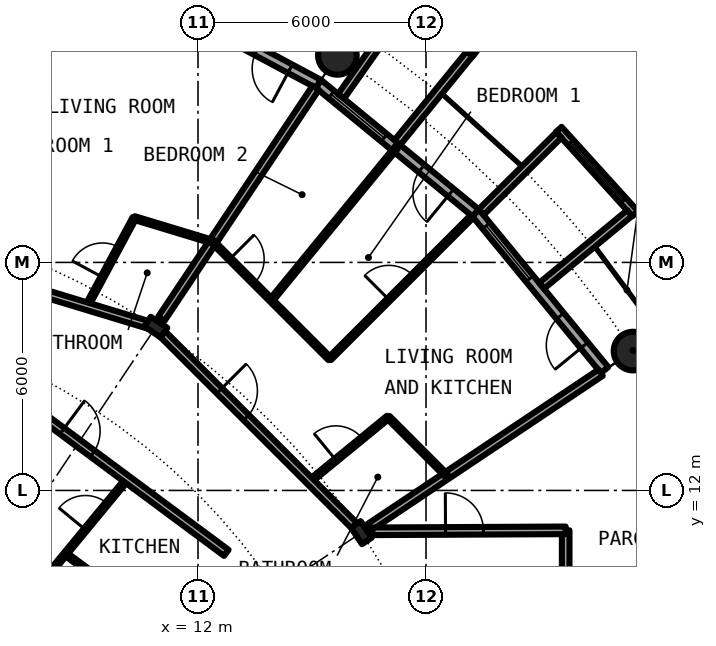
"""IFC4 building model, lengths in metres.
Left out: names, types, materials, properties, quantities, classifications, styles, units other than length and angle.
Written with IfcOpenShell. Run it as: python <this file> out.ifc"""

import sys

from ifc_helpers import new_model, si_unit, direction, frame, frame_2d, origin, origin_2d, place, context, subcontext, project, spatial, rectangle, circle, hollow_circle, i_section, extrude, element, fill, save


model = new_model("IFC4")
c1 = context("Model", 3, precision=1e-05, world=origin(), true_north=direction((0.0, 1.0)))
c2 = subcontext(c1, "Body", "Model", "MODEL_VIEW")
j1 = project(units=[si_unit("LENGTHUNIT", "METRE"), si_unit("PLANEANGLEUNIT", "RADIAN")], contexts=[c1])
p1 = place(None, origin())
s1 = spatial("IfcSite", under=j1, at=p1, CompositionType="ELEMENT")
p2 = place(p1, origin())
s2 = spatial("IfcBuilding", under=s1, at=p2, CompositionType="ELEMENT")
p3 = place(p2, frame((0.0, 0.0, 88.0)))
s3 = spatial("IfcBuildingStorey", under=s2, at=p3, CompositionType="ELEMENT", Elevation=88.0)
for number, where, z_axis, x_axis in (
    (1, (23.448, 15.667, 0.0), (0.0, 0.0, 1.0), (1.0, 0.0, 0.0)),
    (2, (15.667, 23.448, 0.0), (0.0, 0.0, 1.0), (1.0, 0.0, 0.0)),
):
    element("IfcColumn", number, at=place(p3, frame(where, z_axis=z_axis, x_axis=x_axis)), inside=s3, PredefinedType="COLUMN", context=c2, shape_type="SweptSolid", body=[
        extrude(hollow_circle(Radius=0.508, WallThickness=0.04, at=origin_2d()), origin(), (0.0, 0.0, 1.0), 3.05),
    ])
for number, where, z_axis, x_axis in (
    (3, (16.297, 10.889, 0.0), (0.0, 0.0, 1.0), (0.831, 0.556, 0.0)),
    (4, (10.889, 16.297, 0.0), (0.0, 0.0, 1.0), (0.556, 0.831, 0.0)),
):
    element("IfcColumn", number, at=place(p3, frame(where, z_axis=z_axis, x_axis=x_axis)), inside=s3, PredefinedType="COLUMN", context=c2, shape_type="SweptSolid", body=[
        extrude(i_section(OverallWidth=0.306, OverallDepth=0.524, WebThickness=0.021, FlangeThickness=0.04, FilletRadius=0.027, at=origin_2d()), origin(), (0.0, 0.0, 1.0), 3.05),
    ])
p4 = place(p3, frame((22.699, 15.167, 0.0), z_axis=(0.0, 0.0, 1.0), x_axis=(-0.634382322723, 0.773019449054, 0.0)))
e5 = element("IfcWall", 5, at=p4, inside=s3, PredefinedType="SOLIDWALL", context=c2, shape_type="SweptSolid", body=[
    extrude(rectangle(XDim=5.352, YDim=0.25, at=frame_2d((2.676, 0.0))), origin(), (0.0, 0.0, 1.0), 2.7),
])
p5 = place(p4, frame((0.841, 0.0, 0.0)))
e6 = element("IfcOpeningElement", 6, at=p5, cuts=e5, PredefinedType="OPENING", context=c2, shape_type="SweptSolid", body=[
    extrude(rectangle(XDim=1.0, YDim=2.2, at=frame_2d((0.5, 1.1))), frame((0.0, 0.135, 0.0), z_axis=(0.0, -1.0, 0.0), x_axis=(1.0, 0.0, 0.0)), (0.0, 0.0, 1.0), 0.27),
])
p6 = place(p4, frame((3.111, 0.0, 0.3)))
e7 = element("IfcOpeningElement", 7, at=p6, cuts=e5, PredefinedType="OPENING", context=c2, shape_type="SweptSolid", body=[
    extrude(rectangle(XDim=1.8, YDim=2.1, at=frame_2d((0.9, 1.05))), frame((0.0, 0.135, 0.0), z_axis=(0.0, -1.0, 0.0), x_axis=(1.0, 0.0, 0.0)), (0.0, 0.0, 1.0), 0.27),
])
p7 = place(p3, frame((23.503, 19.282, -0.03), z_axis=(0.0, 0.0, 1.0), x_axis=(-0.671506829416, 0.740998365753, 0.0)))
e8 = element("IfcWall", 8, at=p7, inside=s3, PredefinedType="SOLIDWALL", context=c2, shape_type="SweptSolid", body=[
    extrude(rectangle(XDim=2.993, YDim=0.2, at=frame_2d((1.497, 0.0))), origin(), (0.0, 0.0, 1.0), 2.73),
])
p8 = place(p7, frame((0.457, 0.0, 0.33)))
e9 = element("IfcOpeningElement", 9, at=p8, cuts=e8, PredefinedType="OPENING", context=c2, shape_type="SweptSolid", body=[
    extrude(circle(Radius=1.04, at=frame_2d((1.04, 1.04))), frame((0.0, 0.11, 0.0), z_axis=(0.0, -1.0, 0.0), x_axis=(1.0, 0.0, 0.0)), (0.0, 0.0, 1.0), 0.22),
])
p9 = place(p3, frame((21.041, 17.384, -0.03), z_axis=(0.0, 0.0, 1.0), x_axis=(0.770784861449, 0.63709551667, 0.0)))
e10 = element("IfcWall", 10, at=p9, inside=s3, PredefinedType="SOLIDWALL", context=c2, shape_type="SweptSolid", body=[
    extrude(rectangle(XDim=3.006, YDim=0.2, at=frame_2d((1.503, 0.0))), origin(), (0.0, 0.0, 1.0), 2.73),
])
p10 = place(p3, frame((19.45, 19.323, -0.03), z_axis=(0.0, 0.0, 1.0), x_axis=(0.709727076896, 0.704476739375, 0.0)))
e11 = element("IfcWall", 11, at=p10, inside=s3, PredefinedType="SOLIDWALL", context=c2, shape_type="SweptSolid", body=[
    extrude(rectangle(XDim=2.883, YDim=0.2, at=frame_2d((1.441, 0.0))), origin(), (0.0, 0.0, 1.0), 2.73),
])
p11 = place(p3, frame((19.304, 19.304, 0.0), z_axis=(0.0, 0.0, 1.0), x_axis=(-0.773019449054, 0.634382322723, 0.0)))
e12 = element("IfcWall", 12, at=p11, inside=s3, PredefinedType="SOLIDWALL", context=c2, shape_type="SweptSolid", body=[
    extrude(rectangle(XDim=5.352, YDim=0.25, at=frame_2d((2.676, 0.0))), origin(), (0.0, 0.0, 1.0), 2.7),
])
p12 = place(p11, frame((0.841, 0.0, 0.0)))
e13 = element("IfcOpeningElement", 13, at=p12, cuts=e12, PredefinedType="OPENING", context=c2, shape_type="SweptSolid", body=[
    extrude(rectangle(XDim=1.0, YDim=2.2, at=frame_2d((0.5, 1.1))), frame((0.0, 0.135, 0.0), z_axis=(0.0, -1.0, 0.0), x_axis=(1.0, 0.0, 0.0)), (0.0, 0.0, 1.0), 0.27),
])
p13 = place(p11, frame((3.111, 0.0, 0.3)))
e14 = element("IfcOpeningElement", 14, at=p13, cuts=e12, PredefinedType="OPENING", context=c2, shape_type="SweptSolid", body=[
    extrude(rectangle(XDim=1.8, YDim=2.1, at=frame_2d((0.9, 1.05))), frame((0.0, 0.135, 0.0), z_axis=(0.0, -1.0, 0.0), x_axis=(1.0, 0.0, 0.0)), (0.0, 0.0, 1.0), 0.27),
])
p14 = place(p3, frame((19.289, 23.497, -0.03), z_axis=(0.0, 0.0, 1.0), x_axis=(-0.796842165306, 0.60418752353, 0.0)))
e15 = element("IfcWall", 15, at=p14, inside=s3, PredefinedType="SOLIDWALL", context=c2, shape_type="SweptSolid", body=[
    extrude(rectangle(XDim=2.337, YDim=0.2, at=frame_2d((1.168, 0.0))), origin(), (0.0, 0.0, 1.0), 2.73),
])
p15 = place(p14, frame((0.128, 0.0, 0.33)))
e16 = element("IfcOpeningElement", 16, at=p15, cuts=e15, PredefinedType="OPENING", context=c2, shape_type="SweptSolid", body=[
    extrude(circle(Radius=1.04, at=frame_2d((1.04, 1.04))), frame((0.0, 0.11, 0.0), z_axis=(0.0, -1.0, 0.0), x_axis=(1.0, 0.0, 0.0)), (0.0, 0.0, 1.0), 0.22),
])
p16 = place(p3, frame((17.246, 21.155, -0.03), z_axis=(0.0, 0.0, 1.0), x_axis=(0.631741648902, 0.775179004516, 0.0)))
e17 = element("IfcWall", 17, at=p16, inside=s3, PredefinedType="SOLIDWALL", context=c2, shape_type="SweptSolid", body=[
    extrude(rectangle(XDim=3.006, YDim=0.2, at=frame_2d((1.503, 0.0))), origin(), (0.0, 0.0, 1.0), 2.73),
])
p17 = place(p3, frame((15.765, 22.37, -0.03), z_axis=(0.0, 0.0, 1.0), x_axis=(0.576274612209, 0.817256123454, 0.0)))
e18 = element("IfcWall", 18, at=p17, inside=s3, PredefinedType="SOLIDWALL", context=c2, shape_type="SweptSolid", body=[
    extrude(rectangle(XDim=2.933, YDim=0.2, at=frame_2d((1.466, 0.0))), origin(), (0.0, 0.0, 1.0), 2.73),
])
p18 = place(p3, frame((15.167, 22.699, 0.0), z_axis=(0.0, 0.0, 1.0), x_axis=(-0.881915646801, 0.471407246368, 0.0)))
e19 = element("IfcWall", 19, at=p18, inside=s3, PredefinedType="SOLIDWALL", context=c2, shape_type="SweptSolid", body=[
    extrude(rectangle(XDim=5.352, YDim=0.25, at=frame_2d((2.676, 0.0))), origin(), (0.0, 0.0, 1.0), 2.7),
])
p19 = place(p18, frame((0.841, 0.0, 0.0)))
e20 = element("IfcOpeningElement", 20, at=p19, cuts=e19, PredefinedType="OPENING", context=c2, shape_type="SweptSolid", body=[
    extrude(rectangle(XDim=1.0, YDim=2.2, at=frame_2d((0.5, 1.1))), frame((0.0, 0.135, 0.0), z_axis=(0.0, -1.0, 0.0), x_axis=(1.0, 0.0, 0.0)), (0.0, 0.0, 1.0), 0.27),
])
p20 = place(p18, frame((3.111, 0.0, 0.3)))
e21 = element("IfcOpeningElement", 21, at=p20, cuts=e19, PredefinedType="OPENING", context=c2, shape_type="SweptSolid", body=[
    extrude(rectangle(XDim=1.8, YDim=2.1, at=frame_2d((0.9, 1.05))), frame((0.0, 0.135, 0.0), z_axis=(0.0, -1.0, 0.0), x_axis=(1.0, 0.0, 0.0)), (0.0, 0.0, 1.0), 0.27),
])
p21 = place(p3, frame((21.675, 9.3, 0.0), z_axis=(0.0, 0.0, 1.0), x_axis=(0.0, 1.0, 0.0)))
e22 = element("IfcWall", 22, at=p21, inside=s3, PredefinedType="PARTITIONING", context=c2, shape_type="SweptSolid", body=[
    extrude(rectangle(XDim=1.65, YDim=0.2, at=frame_2d((0.825, 0.0))), origin(), (0.0, 0.0, 1.0), 2.7),
])
p22 = place(p3, frame((4.909, 5.958, 0.0), z_axis=(0.0, 0.0, 1.0), x_axis=(0.635976043025, 0.771708800454, 0.0)))
e23 = element("IfcWall", 23, at=p22, inside=s3, PredefinedType="PARTITIONING", context=c2, shape_type="SweptSolid", body=[
    extrude(rectangle(XDim=8.213, YDim=0.1, at=frame_2d((4.106, 0.0))), origin(), (0.0, 0.0, 1.0), 2.7),
])
p23 = place(p22, frame((6.49, 0.0, 0.0)))
e24 = element("IfcOpeningElement", 24, at=p23, cuts=e23, PredefinedType="OPENING", context=c2, shape_type="SweptSolid", body=[
    extrude(rectangle(XDim=0.9, YDim=2.3, at=frame_2d((0.45, 1.15))), frame((0.0, 0.06, 0.0), z_axis=(0.0, -1.0, 0.0), x_axis=(1.0, 0.0, 0.0)), (0.0, 0.0, 1.0), 0.12),
])
p24 = place(p22, frame((2.384, 0.0, 0.0)))
e25 = element("IfcOpeningElement", 25, at=p24, cuts=e23, PredefinedType="OPENING", context=c2, shape_type="SweptSolid", body=[
    extrude(rectangle(XDim=0.9, YDim=2.3, at=frame_2d((0.45, 1.15))), frame((0.0, 0.06, 0.0), z_axis=(0.0, -1.0, 0.0), x_axis=(1.0, 0.0, 0.0)), (0.0, 0.0, 1.0), 0.12),
])
p25 = place(p3, frame((9.074, 16.847, 0.0), z_axis=(0.0, 0.0, 1.0), x_axis=(0.474160570331, 0.880438387136, 0.0)))
e26 = element("IfcWall", 26, at=p25, inside=s3, PredefinedType="PARTITIONING", context=c2, shape_type="SweptSolid", body=[
    extrude(rectangle(XDim=2.636, YDim=0.1, at=frame_2d((1.318, 0.0))), origin(), (0.0, 0.0, 1.0), 2.7),
])
p26 = place(p25, frame((0.868, 0.0, 0.0)))
e27 = element("IfcOpeningElement", 27, at=p26, cuts=e26, PredefinedType="OPENING", context=c2, shape_type="SweptSolid", body=[
    extrude(rectangle(XDim=0.9, YDim=2.3, at=frame_2d((0.45, 1.15))), frame((0.0, 0.06, 0.0), z_axis=(0.0, -1.0, 0.0), x_axis=(1.0, 0.0, 0.0)), (0.0, 0.0, 1.0), 0.12),
])
p27 = place(p3, frame((11.035, 16.515, 0.0), z_axis=(0.0, 0.0, 1.0), x_axis=(0.555516661303, 0.831505405283, 0.0)))
e28 = element("IfcWall", 28, at=p27, inside=s3, PredefinedType="PARTITIONING", context=c2, shape_type="SweptSolid", body=[
    extrude(rectangle(XDim=7.312, YDim=0.2, at=frame_2d((3.656, 0.0))), origin(), (0.0, 0.0, 1.0), 2.7),
])
p28 = place(p3, frame((13.927, 17.004, 0.0), z_axis=(0.0, 0.0, 1.0), x_axis=(0.633774976367, 0.773517471898, 0.0)))
e29 = element("IfcWall", 29, at=p28, inside=s3, PredefinedType="PARTITIONING", context=c2, shape_type="SweptSolid", body=[
    extrude(rectangle(XDim=5.196, YDim=0.1, at=frame_2d((2.598, 0.0))), origin(), (0.0, 0.0, 1.0), 2.7),
])
p29 = place(p3, frame((14.945, 12.241, 0.0), z_axis=(0.0, 0.0, 1.0), x_axis=(0.77367517848, 0.633582447834, 0.0)))
e30 = element("IfcWall", 30, at=p29, inside=s3, PredefinedType="PARTITIONING", context=c2, shape_type="SweptSolid", body=[
    extrude(rectangle(XDim=2.661, YDim=0.1, at=frame_2d((1.331, 0.0))), origin(), (0.0, 0.0, 1.0), 2.7),
])
p30 = place(p29, frame((0.881, 0.0, 0.0)))
e31 = element("IfcOpeningElement", 31, at=p30, cuts=e30, PredefinedType="OPENING", context=c2, shape_type="SweptSolid", body=[
    extrude(rectangle(XDim=0.9, YDim=2.3, at=frame_2d((0.45, 1.15))), frame((0.0, 0.06, 0.0), z_axis=(0.0, -1.0, 0.0), x_axis=(1.0, 0.0, 0.0)), (0.0, 0.0, 1.0), 0.12),
])
p31 = place(p3, frame((15.465, 15.465, 0.0), z_axis=(0.0, 0.0, 1.0), x_axis=(0.707106781187, 0.707106781187, 0.0)))
e32 = element("IfcWall", 32, at=p31, inside=s3, PredefinedType="PARTITIONING", context=c2, shape_type="SweptSolid", body=[
    extrude(rectangle(XDim=5.305, YDim=0.1, at=frame_2d((2.652, 0.0))), origin(), (0.0, 0.0, 1.0), 2.7),
])
p32 = place(p31, frame((2.202, 0.0, 0.0)))
e33 = element("IfcOpeningElement", 33, at=p32, cuts=e32, PredefinedType="OPENING", context=c2, shape_type="SweptSolid", body=[
    extrude(rectangle(XDim=0.9, YDim=2.3, at=frame_2d((0.45, 1.15))), frame((0.0, 0.06, 0.0), z_axis=(0.0, -1.0, 0.0), x_axis=(1.0, 0.0, 0.0)), (0.0, 0.0, 1.0), 0.12),
])
p33 = place(p3, frame((16.515, 11.034, 0.0), z_axis=(0.0, 0.0, 1.0), x_axis=(0.831382022135, 0.555701298605, 0.0)))
e34 = element("IfcWall", 34, at=p33, inside=s3, PredefinedType="PARTITIONING", context=c2, shape_type="SweptSolid", body=[
    extrude(rectangle(XDim=7.313, YDim=0.2, at=frame_2d((3.657, 0.0))), origin(), (0.0, 0.0, 1.0), 2.7),
])
p34 = place(p3, frame((16.588, 10.925, 0.0), z_axis=(0.0, 0.0, 1.0), x_axis=(0.999988019025, 0.004895079807, 0.0)))
e35 = element("IfcWall", 35, at=p34, inside=s3, PredefinedType="PARTITIONING", context=c2, shape_type="SweptSolid", body=[
    extrude(rectangle(XDim=5.087, YDim=0.2, at=frame_2d((2.543, 0.0))), origin(), (0.0, 0.0, 1.0), 2.7),
])
p35 = place(p34, frame((1.925, 0.0, 0.0)))
e36 = element("IfcOpeningElement", 36, at=p35, cuts=e35, PredefinedType="OPENING", context=c2, shape_type="SweptSolid", body=[
    extrude(rectangle(XDim=1.0, YDim=2.3, at=frame_2d((0.5, 1.15))), frame((0.0, 0.11, 0.0), z_axis=(0.0, -1.0, 0.0), x_axis=(1.0, 0.0, 0.0)), (0.0, 0.0, 1.0), 0.22),
])
p36 = place(p3, frame((8.512, 10.332, 0.0), z_axis=(0.0, 0.0, 1.0), x_axis=(0.803135014325, -0.595797070121, 0.0)))
e37 = element("IfcWall", 37, at=p36, inside=s3, PredefinedType="PARTITIONING", context=c2, shape_type="SweptSolid", body=[
    extrude(rectangle(XDim=1.732, YDim=0.1, at=frame_2d((0.866, 0.0))), origin(), (0.0, 0.0, 1.0), 2.7),
])
p37 = place(p3, frame((4.906, 16.172, 0.0), z_axis=(0.0, 0.0, 1.0), x_axis=(0.803191461888, -0.595720971219, 0.0)))
e38 = element("IfcWall", 38, at=p37, inside=s3, PredefinedType="PARTITIONING", context=c2, shape_type="SweptSolid", body=[
    extrude(rectangle(XDim=9.76, YDim=0.2, at=frame_2d((4.88, 0.0))), origin(), (0.0, 0.0, 1.0), 2.7),
])
p38 = place(p37, frame((4.38, 0.0, 0.0)))
e39 = element("IfcOpeningElement", 39, at=p38, cuts=e38, PredefinedType="OPENING", context=c2, shape_type="SweptSolid", body=[
    extrude(rectangle(XDim=1.0, YDim=2.3, at=frame_2d((0.5, 1.15))), frame((0.0, 0.11, 0.0), z_axis=(0.0, -1.0, 0.0), x_axis=(1.0, 0.0, 0.0)), (0.0, 0.0, 1.0), 0.22),
])
p39 = place(p3, frame((-0.007, 19.599, 0.0), z_axis=(0.0, 0.0, 1.0), x_axis=(0.95700958731, -0.290056287291, 0.0)))
e40 = element("IfcWall", 40, at=p39, inside=s3, PredefinedType="PARTITIONING", context=c2, shape_type="SweptSolid", body=[
    extrude(rectangle(XDim=11.226, YDim=0.2, at=frame_2d((5.613, 0.0))), origin(), (0.0, 0.0, 1.0), 2.38),
])
p40 = place(p39, frame((7.093, 0.0, 0.0)))
e41 = element("IfcOpeningElement", 41, at=p40, cuts=e40, PredefinedType="OPENING", context=c2, shape_type="SweptSolid", body=[
    extrude(rectangle(XDim=1.0, YDim=2.3, at=frame_2d((0.5, 1.15))), frame((0.0, 0.11, 0.0), z_axis=(0.0, -1.0, 0.0), x_axis=(1.0, 0.0, 0.0)), (0.0, 0.0, 1.0), 0.22),
])
p41 = place(p3, frame((11.0, 16.186, 0.0), z_axis=(0.0, 0.0, 1.0), x_axis=(0.707106781187, -0.707106781187, 0.0)))
e42 = element("IfcWall", 42, at=p41, inside=s3, PredefinedType="PARTITIONING", context=c2, shape_type="SweptSolid", body=[
    extrude(rectangle(XDim=7.334, YDim=0.2, at=frame_2d((3.667, 0.0))), origin(), (0.0, 0.0, 1.0), 2.38),
])
p42 = place(p41, frame((2.211, 0.0, 0.0)))
e43 = element("IfcOpeningElement", 43, at=p42, cuts=e42, PredefinedType="OPENING", context=c2, shape_type="SweptSolid", body=[
    extrude(rectangle(XDim=1.0, YDim=2.3, at=frame_2d((0.5, 1.15))), frame((0.0, 0.11, 0.0), z_axis=(0.0, -1.0, 0.0), x_axis=(1.0, 0.0, 0.0)), (0.0, 0.0, 1.0), 0.22),
])
p43 = place(p3, frame((10.324, 19.168, 0.0), z_axis=(0.0, 0.0, 1.0), x_axis=(0.956993947591, -0.290107883852, 0.0)))
e44 = element("IfcWall", 44, at=p43, inside=s3, PredefinedType="PARTITIONING", context=c2, shape_type="SweptSolid", body=[
    extrude(rectangle(XDim=2.158, YDim=0.1, at=frame_2d((1.079, 0.0))), origin(), (0.0, 0.0, 1.0), 2.7),
])
p44 = place(p3, frame((12.389, 18.542, 0.0), z_axis=(0.0, 0.0, 1.0), x_axis=(0.707022606819, -0.707190945535, 0.0)))
e45 = element("IfcWall", 45, at=p44, inside=s3, PredefinedType="PARTITIONING", context=c2, shape_type="SweptSolid", body=[
    extrude(rectangle(XDim=4.351, YDim=0.1, at=frame_2d((2.175, 0.0))), origin(), (0.0, 0.0, 1.0), 2.7),
])
p45 = place(p44, frame((0.639, 0.0, 0.0)))
e46 = element("IfcOpeningElement", 46, at=p45, cuts=e45, PredefinedType="OPENING", context=c2, shape_type="SweptSolid", body=[
    extrude(rectangle(XDim=0.9, YDim=2.3, at=frame_2d((0.45, 1.15))), frame((0.0, 0.06, 0.0), z_axis=(0.0, -1.0, 0.0), x_axis=(1.0, 0.0, 0.0)), (0.0, 0.0, 1.0), 0.12),
])
p46 = place(p3, frame((17.006, 13.924, 0.0), z_axis=(0.0, 0.0, 1.0), x_axis=(0.706826194425, -0.707387256653, 0.0)))
e47 = element("IfcWall", 47, at=p46, inside=s3, PredefinedType="PARTITIONING", context=c2, shape_type="SweptSolid", body=[
    extrude(rectangle(XDim=2.176, YDim=0.1, at=frame_2d((1.088, 0.0))), origin(), (0.0, 0.0, 1.0), 2.7),
])
p47 = place(p5, origin())
e48 = element("IfcDoor", 48, at=p47, inside=s3, OperationType="SINGLE_SWING_LEFT", PredefinedType="DOOR", context=c2, shape_type="SweptSolid", body=[
    extrude(rectangle(XDim=1.0, YDim=2.2, at=frame_2d((0.5, 1.1))), frame((0.0, 0.025, 0.0), z_axis=(0.0, -1.0, 0.0), x_axis=(1.0, 0.0, 0.0)), (0.0, 0.0, 1.0), 0.05),
])
fill(e6, e48)
p48 = place(p6, origin())
e49 = element("IfcWindow", 49, at=p48, inside=s3, PartitioningType="SINGLE_PANEL", PredefinedType="WINDOW", context=c2, shape_type="SweptSolid", body=[
    extrude(rectangle(XDim=1.8, YDim=2.1, at=frame_2d((0.9, 1.05))), frame((0.0, 0.03, 0.0), z_axis=(0.0, -1.0, 0.0), x_axis=(1.0, 0.0, 0.0)), (0.0, 0.0, 1.0), 0.06),
])
fill(e7, e49)
p49 = place(p8, origin())
e50 = element("IfcWindow", 50, at=p49, inside=s3, PartitioningType="SINGLE_PANEL", PredefinedType="WINDOW", context=c2, shape_type="SweptSolid", body=[
    extrude(circle(Radius=1.04, at=frame_2d((1.04, 1.04))), frame((0.0, 0.03, 0.0), z_axis=(0.0, -1.0, 0.0), x_axis=(1.0, 0.0, 0.0)), (0.0, 0.0, 1.0), 0.06),
])
fill(e9, e50)
p50 = place(p12, origin())
e51 = element("IfcDoor", 51, at=p50, inside=s3, OperationType="SINGLE_SWING_LEFT", PredefinedType="DOOR", context=c2, shape_type="SweptSolid", body=[
    extrude(rectangle(XDim=1.0, YDim=2.2, at=frame_2d((0.5, 1.1))), frame((0.0, 0.025, 0.0), z_axis=(0.0, -1.0, 0.0), x_axis=(1.0, 0.0, 0.0)), (0.0, 0.0, 1.0), 0.05),
])
fill(e13, e51)
p51 = place(p13, origin())
e52 = element("IfcWindow", 52, at=p51, inside=s3, PartitioningType="SINGLE_PANEL", PredefinedType="WINDOW", context=c2, shape_type="SweptSolid", body=[
    extrude(rectangle(XDim=1.8, YDim=2.1, at=frame_2d((0.9, 1.05))), frame((0.0, 0.03, 0.0), z_axis=(0.0, -1.0, 0.0), x_axis=(1.0, 0.0, 0.0)), (0.0, 0.0, 1.0), 0.06),
])
fill(e14, e52)
p52 = place(p19, origin())
e53 = element("IfcDoor", 53, at=p52, inside=s3, OperationType="SINGLE_SWING_LEFT", PredefinedType="DOOR", context=c2, shape_type="SweptSolid", body=[
    extrude(rectangle(XDim=1.0, YDim=2.2, at=frame_2d((0.5, 1.1))), frame((0.0, 0.025, 0.0), z_axis=(0.0, -1.0, 0.0), x_axis=(1.0, 0.0, 0.0)), (0.0, 0.0, 1.0), 0.05),
])
fill(e20, e53)
p53 = place(p42, origin())
e54 = element("IfcDoor", 54, at=p53, inside=s3, OperationType="SINGLE_SWING_LEFT", PredefinedType="DOOR", context=c2, shape_type="SweptSolid", body=[
    extrude(rectangle(XDim=1.0, YDim=2.3, at=frame_2d((0.5, 1.15))), frame((0.0, 0.025, 0.0), z_axis=(0.0, -1.0, 0.0), x_axis=(1.0, 0.0, 0.0)), (0.0, 0.0, 1.0), 0.05),
])
fill(e43, e54)
p54 = place(p30, origin())
e55 = element("IfcDoor", 55, at=p54, inside=s3, OperationType="SINGLE_SWING_LEFT", PredefinedType="DOOR", context=c2, shape_type="SweptSolid", body=[
    extrude(rectangle(XDim=0.9, YDim=2.3, at=frame_2d((0.45, 1.15))), frame((0.0, 0.025, 0.0), z_axis=(0.0, -1.0, 0.0), x_axis=(1.0, 0.0, 0.0)), (0.0, 0.0, 1.0), 0.05),
])
fill(e31, e55)
p55 = place(p32, origin())
e56 = element("IfcDoor", 56, at=p55, inside=s3, OperationType="SINGLE_SWING_RIGHT", PredefinedType="DOOR", context=c2, shape_type="SweptSolid", body=[
    extrude(rectangle(XDim=0.9, YDim=2.3, at=frame_2d((0.45, 1.15))), frame((0.0, 0.025, 0.0), z_axis=(0.0, -1.0, 0.0), x_axis=(1.0, 0.0, 0.0)), (0.0, 0.0, 1.0), 0.05),
])
fill(e33, e56)
p56 = place(p45, origin())
e57 = element("IfcDoor", 57, at=p56, inside=s3, OperationType="SINGLE_SWING_LEFT", PredefinedType="DOOR", context=c2, shape_type="SweptSolid", body=[
    extrude(rectangle(XDim=0.9, YDim=2.3, at=frame_2d((0.45, 1.15))), frame((0.0, 0.025, 0.0), z_axis=(0.0, -1.0, 0.0), x_axis=(1.0, 0.0, 0.0)), (0.0, 0.0, 1.0), 0.05),
])
fill(e46, e57)
p57 = place(p26, origin())
e58 = element("IfcDoor", 58, at=p57, inside=s3, OperationType="SINGLE_SWING_RIGHT", PredefinedType="DOOR", context=c2, shape_type="SweptSolid", body=[
    extrude(rectangle(XDim=0.9, YDim=2.3, at=frame_2d((0.45, 1.15))), frame((0.0, 0.025, 0.0), z_axis=(0.0, -1.0, 0.0), x_axis=(1.0, 0.0, 0.0)), (0.0, 0.0, 1.0), 0.05),
])
fill(e27, e58)
p58 = place(p38, origin())
e59 = element("IfcDoor", 59, at=p58, inside=s3, OperationType="SINGLE_SWING_LEFT", PredefinedType="DOOR", context=c2, shape_type="SweptSolid", body=[
    extrude(rectangle(XDim=1.0, YDim=2.3, at=frame_2d((0.5, 1.15))), frame((0.0, 0.025, 0.0), z_axis=(0.0, -1.0, 0.0), x_axis=(1.0, 0.0, 0.0)), (0.0, 0.0, 1.0), 0.05),
])
fill(e39, e59)
p59 = place(p23, origin())
e60 = element("IfcDoor", 60, at=p59, inside=s3, OperationType="SINGLE_SWING_RIGHT", PredefinedType="DOOR", context=c2, shape_type="SweptSolid", body=[
    extrude(rectangle(XDim=0.9, YDim=2.3, at=frame_2d((0.45, 1.15))), frame((0.0, 0.025, 0.0), z_axis=(0.0, -1.0, 0.0), x_axis=(1.0, 0.0, 0.0)), (0.0, 0.0, 1.0), 0.05),
])
fill(e24, e60)
p60 = place(p35, origin())
e61 = element("IfcDoor", 61, at=p60, inside=s3, OperationType="SINGLE_SWING_LEFT", PredefinedType="DOOR", context=c2, shape_type="SweptSolid", body=[
    extrude(rectangle(XDim=1.0, YDim=2.3, at=frame_2d((0.5, 1.15))), frame((0.0, 0.025, 0.0), z_axis=(0.0, -1.0, 0.0), x_axis=(1.0, 0.0, 0.0)), (0.0, 0.0, 1.0), 0.05),
])
fill(e36, e61)
save(model, sys.argv[1])
